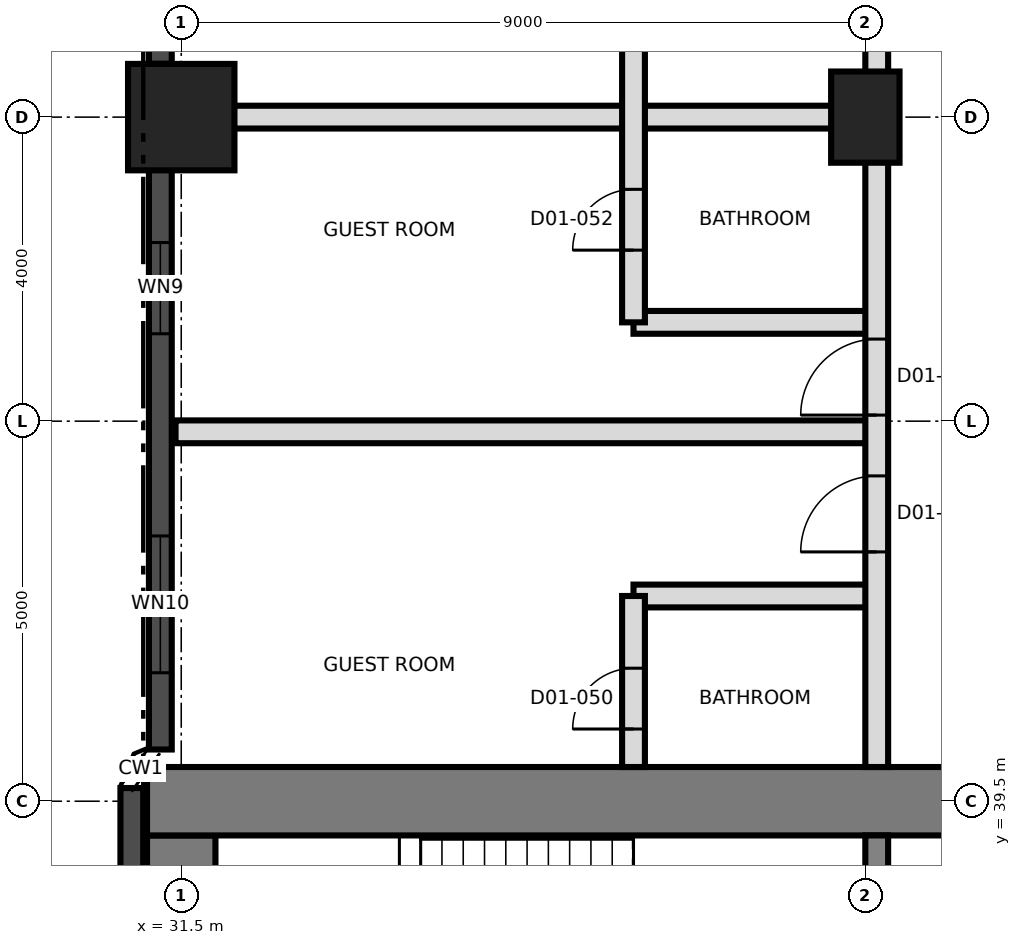
"""IFC4 building model, lengths in metres.
Left out: names, types, materials, properties, quantities, classifications, styles, units other than length and angle.
Written with IfcOpenShell. Run it as: python <this file> out.ifc"""

import sys

from ifc_helpers import new_model, si_unit, direction, frame, frame_2d, origin, origin_2d, place, context, subcontext, project, spatial, rectangle, extrude, element, fill, save


model = new_model("IFC4")
c1 = context("Model", 3, precision=1e-05, world=origin(), true_north=direction((0.0, 1.0)))
c2 = subcontext(c1, "Body", "Model", "MODEL_VIEW")
j1 = project(units=[si_unit("LENGTHUNIT", "METRE"), si_unit("PLANEANGLEUNIT", "RADIAN")], contexts=[c1])
p1 = place(None, origin())
s1 = spatial("IfcSite", under=j1, at=p1, CompositionType="ELEMENT")
p2 = place(p1, origin())
s2 = spatial("IfcBuilding", under=s1, at=p2, CompositionType="ELEMENT")
p3 = place(p2, frame((0.0, 0.0, 40.9)))
s3 = spatial("IfcBuildingStorey", under=s2, at=p3, CompositionType="ELEMENT", Elevation=40.9)
p4 = place(p3, frame((31.5, 21.95, 0.0), z_axis=(0.0, 0.0, 1.0), x_axis=(0.0, 1.0, 0.0)))
e1 = element("IfcWall", 1, at=p4, inside=s3, PredefinedType="SHEAR", context=c2, shape_type="SweptSolid", body=[
    extrude(rectangle(XDim=17.1, YDim=0.9, at=frame_2d((8.55, 0.0))), origin(), (0.0, 0.0, 1.0), 3.7),
])
p5 = place(p3, frame((31.05, 39.5, 0.0), z_axis=(0.0, 0.0, 1.0), x_axis=(1.0, 0.0, 0.0)))
e2 = element("IfcWall", 2, at=p5, inside=s3, PredefinedType="SHEAR", context=c2, shape_type="SweptSolid", body=[
    extrude(rectangle(XDim=27.0, YDim=0.9, at=frame_2d((13.5, 0.0))), origin(), (0.0, 0.0, 1.0), 3.7),
])
p6 = place(p5, frame((10.65, 0.0, 0.0)))
e3 = element("IfcOpeningElement", 3, at=p6, cuts=e2, PredefinedType="OPENING", context=c2, shape_type="SweptSolid", body=[
    extrude(rectangle(XDim=1.2, YDim=2.1, at=frame_2d((0.6, 1.05))), frame((0.0, 0.46, 0.0), z_axis=(0.0, -1.0, 0.0), x_axis=(1.0, 0.0, 0.0)), (0.0, 0.0, 1.0), 0.92),
])
p7 = place(p3, frame((40.65, 33.5, 0.0), z_axis=(0.0, 0.0, 1.0), x_axis=(0.0, 1.0, 0.0)))
e4 = element("IfcWall", 4, at=p7, inside=s3, PredefinedType="SHEAR", context=c2, shape_type="SweptSolid", body=[
    extrude(rectangle(XDim=5.55, YDim=0.3, at=frame_2d((2.775, 0.0))), origin(), (0.0, 0.0, 1.0), 3.7),
])
p8 = place(p3, frame((31.5, 48.5, 0.0), z_axis=(0.0, 0.0, 1.0), x_axis=(1.0, 0.0, 0.0)))
e5 = element("IfcColumn", 5, at=p8, inside=s3, PredefinedType="COLUMN", context=c2, shape_type="SweptSolid", body=[
    extrude(rectangle(XDim=1.4, YDim=1.4, at=origin_2d()), origin(), (0.0, 0.0, 1.0), 3.7),
])
p9 = place(p3, frame((40.5, 48.5, 0.0), z_axis=(0.0, 0.0, 1.0), x_axis=(0.0, 1.0, 0.0)))
e6 = element("IfcColumn", 6, at=p9, inside=s3, PredefinedType="COLUMN", context=c2, shape_type="SweptSolid", body=[
    extrude(rectangle(XDim=1.2, YDim=0.9, at=origin_2d()), origin(), (0.0, 0.0, 1.0), 3.7),
])
p10 = place(p3, frame((31.225, 56.8, 0.0), z_axis=(0.0, 0.0, 1.0), x_axis=(0.0, -1.0, 0.0)))
e7 = element("IfcWall", 7, at=p10, inside=s3, PredefinedType="SOLIDWALL", context=c2, shape_type="SweptSolid", body=[
    extrude(rectangle(XDim=7.6, YDim=0.3, at=frame_2d((3.8, 0.0))), origin(), (0.0, 0.0, 1.0), 2.7),
])
p11 = place(p10, frame((0.95, 0.0, 0.9)))
e8 = element("IfcOpeningElement", 8, at=p11, cuts=e7, PredefinedType="OPENING", context=c2, shape_type="SweptSolid", body=[
    extrude(rectangle(XDim=1.2, YDim=1.5, at=frame_2d((0.6, 0.75))), frame((0.0, 0.16, 0.0), z_axis=(0.0, -1.0, 0.0), x_axis=(1.0, 0.0, 0.0)), (0.0, 0.0, 1.0), 0.32),
])
p12 = place(p10, frame((5.45, 0.0, 0.9)))
e9 = element("IfcOpeningElement", 9, at=p12, cuts=e7, PredefinedType="OPENING", context=c2, shape_type="SweptSolid", body=[
    extrude(rectangle(XDim=1.2, YDim=1.5, at=frame_2d((0.6, 0.75))), frame((0.0, 0.16, 0.0), z_axis=(0.0, -1.0, 0.0), x_axis=(1.0, 0.0, 0.0)), (0.0, 0.0, 1.0), 0.32),
])
p13 = place(p3, frame((31.225, 49.2, 0.0), z_axis=(0.0, 0.0, 1.0), x_axis=(0.0, -1.0, 0.0)))
e10 = element("IfcWall", 10, at=p13, inside=s3, PredefinedType="SOLIDWALL", context=c2, shape_type="SweptSolid", body=[
    extrude(rectangle(XDim=9.02, YDim=0.3, at=frame_2d((4.51, 0.0))), origin(), (0.0, 0.0, 1.0), 3.4),
])
p14 = place(p13, frame((2.35, 0.0, 0.9)))
e11 = element("IfcOpeningElement", 11, at=p14, cuts=e10, PredefinedType="OPENING", context=c2, shape_type="SweptSolid", body=[
    extrude(rectangle(XDim=1.2, YDim=1.5, at=frame_2d((0.6, 0.75))), frame((0.0, 0.16, 0.0), z_axis=(0.0, -1.0, 0.0), x_axis=(1.0, 0.0, 0.0)), (0.0, 0.0, 1.0), 0.32),
])
p15 = place(p13, frame((6.21, 0.0, 0.3)))
e12 = element("IfcOpeningElement", 12, at=p15, cuts=e10, PredefinedType="OPENING", context=c2, shape_type="SweptSolid", body=[
    extrude(rectangle(XDim=1.8, YDim=2.4, at=frame_2d((0.9, 1.2))), frame((0.0, 0.16, 0.0), z_axis=(0.0, -1.0, 0.0), x_axis=(1.0, 0.0, 0.0)), (0.0, 0.0, 1.0), 0.32),
])
p16 = place(p3, frame((30.85, 39.674, 0.0), z_axis=(0.0, 0.0, 1.0), x_axis=(0.0, -1.0, 0.0)))
e13 = element("IfcWall", 13, at=p16, inside=s3, PredefinedType="SOLIDWALL", context=c2, shape_type="SweptSolid", body=[
    extrude(rectangle(XDim=18.314, YDim=0.3, at=frame_2d((9.157, 0.0))), origin(), (0.0, 0.0, 1.0), 3.4),
])
p17 = place(p3, frame((37.45, 42.2, 0.0), z_axis=(0.0, 0.0, 1.0), x_axis=(1.0, 0.0, 0.0)))
e14 = element("IfcWall", 14, at=p17, inside=s3, PredefinedType="PARTITIONING", context=c2, shape_type="SweptSolid", body=[
    extrude(rectangle(XDim=3.2, YDim=0.3, at=frame_2d((1.6, 0.0))), origin(), (0.0, 0.0, 1.0), 3.4),
])
p18 = place(p3, frame((31.425, 44.36, 0.0), z_axis=(0.0, 0.0, 1.0), x_axis=(1.0, 0.0, 0.0)))
e15 = element("IfcWall", 15, at=p18, inside=s3, PredefinedType="PARTITIONING", context=c2, shape_type="SweptSolid", body=[
    extrude(rectangle(XDim=9.225, YDim=0.3, at=frame_2d((4.612, 0.0))), origin(), (0.0, 0.0, 1.0), 3.4),
])
p19 = place(p3, frame((37.45, 45.8, 0.0), z_axis=(0.0, 0.0, 1.0), x_axis=(1.0, 0.0, 0.0)))
e16 = element("IfcWall", 16, at=p19, inside=s3, PredefinedType="PARTITIONING", context=c2, shape_type="SweptSolid", body=[
    extrude(rectangle(XDim=3.2, YDim=0.3, at=frame_2d((1.6, 0.0))), origin(), (0.0, 0.0, 1.0), 3.4),
])
p20 = place(p3, frame((31.425, 48.5, 0.0), z_axis=(0.0, 0.0, 1.0), x_axis=(1.0, 0.0, 0.0)))
e17 = element("IfcWall", 17, at=p20, inside=s3, PredefinedType="PARTITIONING", context=c2, shape_type="SweptSolid", body=[
    extrude(rectangle(XDim=9.225, YDim=0.3, at=frame_2d((4.612, 0.0))), origin(), (0.0, 0.0, 1.0), 3.4),
])
p21 = place(p3, frame((37.45, 39.95, 0.0), z_axis=(0.0, 0.0, 1.0), x_axis=(0.0, 1.0, 0.0)))
e18 = element("IfcWall", 18, at=p21, inside=s3, PredefinedType="PARTITIONING", context=c2, shape_type="SweptSolid", body=[
    extrude(rectangle(XDim=2.25, YDim=0.3, at=frame_2d((1.125, 0.0))), origin(), (0.0, 0.0, 1.0), 3.4),
])
p22 = place(p21, frame((0.5, 0.0, 0.0)))
e19 = element("IfcOpeningElement", 19, at=p22, cuts=e18, PredefinedType="OPENING", context=c2, shape_type="SweptSolid", body=[
    extrude(rectangle(XDim=0.8, YDim=2.1, at=frame_2d((0.4, 1.05))), frame((0.0, 0.16, 0.0), z_axis=(0.0, -1.0, 0.0), x_axis=(1.0, 0.0, 0.0)), (0.0, 0.0, 1.0), 0.32),
])
p23 = place(p3, frame((37.45, 45.8, 0.0), z_axis=(0.0, 0.0, 1.0), x_axis=(0.0, 1.0, 0.0)))
e20 = element("IfcWall", 20, at=p23, inside=s3, PredefinedType="PARTITIONING", context=c2, shape_type="SweptSolid", body=[
    extrude(rectangle(XDim=5.4, YDim=0.3, at=frame_2d((2.7, 0.0))), origin(), (0.0, 0.0, 1.0), 3.4),
])
p24 = place(p23, frame((0.95, 0.0, 0.0)))
e21 = element("IfcOpeningElement", 21, at=p24, cuts=e20, PredefinedType="OPENING", context=c2, shape_type="SweptSolid", body=[
    extrude(rectangle(XDim=0.8, YDim=2.1, at=frame_2d((0.4, 1.05))), frame((0.0, 0.16, 0.0), z_axis=(0.0, -1.0, 0.0), x_axis=(1.0, 0.0, 0.0)), (0.0, 0.0, 1.0), 0.32),
])
p25 = place(p23, frame((3.65, 0.0, 0.0)))
e22 = element("IfcOpeningElement", 22, at=p25, cuts=e20, PredefinedType="OPENING", context=c2, shape_type="SweptSolid", body=[
    extrude(rectangle(XDim=0.8, YDim=2.1, at=frame_2d((0.4, 1.05))), frame((0.0, 0.16, 0.0), z_axis=(0.0, -1.0, 0.0), x_axis=(1.0, 0.0, 0.0)), (0.0, 0.0, 1.0), 0.32),
])
p26 = place(p3, frame((40.65, 39.95, 0.0), z_axis=(0.0, 0.0, 1.0), x_axis=(0.0, 1.0, 0.0)))
e23 = element("IfcWall", 23, at=p26, inside=s3, PredefinedType="PARTITIONING", context=c2, shape_type="SweptSolid", body=[
    extrude(rectangle(XDim=35.625, YDim=0.3, at=frame_2d((17.812, 0.0))), origin(), (0.0, 0.0, 1.0), 3.4),
])
p27 = place(p26, frame((2.83, 0.0, 0.0)))
e24 = element("IfcOpeningElement", 24, at=p27, cuts=e23, PredefinedType="OPENING", context=c2, shape_type="SweptSolid", body=[
    extrude(rectangle(XDim=1.0, YDim=2.1, at=frame_2d((0.5, 1.05))), frame((0.0, 0.16, 0.0), z_axis=(0.0, -1.0, 0.0), x_axis=(1.0, 0.0, 0.0)), (0.0, 0.0, 1.0), 0.32),
])
p28 = place(p26, frame((4.63, 0.0, 0.0)))
e25 = element("IfcOpeningElement", 25, at=p28, cuts=e23, PredefinedType="OPENING", context=c2, shape_type="SweptSolid", body=[
    extrude(rectangle(XDim=1.0, YDim=2.1, at=frame_2d((0.5, 1.05))), frame((0.0, 0.16, 0.0), z_axis=(0.0, -1.0, 0.0), x_axis=(1.0, 0.0, 0.0)), (0.0, 0.0, 1.0), 0.32),
])
p29 = place(p26, frame((11.47, 0.0, 0.0)))
e26 = element("IfcOpeningElement", 26, at=p29, cuts=e23, PredefinedType="OPENING", context=c2, shape_type="SweptSolid", body=[
    extrude(rectangle(XDim=1.0, YDim=2.1, at=frame_2d((0.5, 1.05))), frame((0.0, 0.16, 0.0), z_axis=(0.0, -1.0, 0.0), x_axis=(1.0, 0.0, 0.0)), (0.0, 0.0, 1.0), 0.32),
])
p30 = place(p26, frame((13.27, 0.0, 0.0)))
e27 = element("IfcOpeningElement", 27, at=p30, cuts=e23, PredefinedType="OPENING", context=c2, shape_type="SweptSolid", body=[
    extrude(rectangle(XDim=1.0, YDim=2.1, at=frame_2d((0.5, 1.05))), frame((0.0, 0.16, 0.0), z_axis=(0.0, -1.0, 0.0), x_axis=(1.0, 0.0, 0.0)), (0.0, 0.0, 1.0), 0.32),
])
p31 = place(p26, frame((21.05, 0.0, 0.0)))
e28 = element("IfcOpeningElement", 28, at=p31, cuts=e23, PredefinedType="OPENING", context=c2, shape_type="SweptSolid", body=[
    extrude(rectangle(XDim=1.0, YDim=2.4, at=frame_2d((0.5, 1.2))), frame((0.0, 0.16, 0.0), z_axis=(0.0, -1.0, 0.0), x_axis=(1.0, 0.0, 0.0)), (0.0, 0.0, 1.0), 0.32),
])
p32 = place(p14, origin())
e29 = element("IfcWindow", 29, at=p32, inside=s3, PartitioningType="SINGLE_PANEL", PredefinedType="WINDOW", context=c2, shape_type="SweptSolid", body=[
    extrude(rectangle(XDim=1.2, YDim=1.5, at=frame_2d((0.6, 0.75))), frame((0.0, 0.03, 0.0), z_axis=(0.0, -1.0, 0.0), x_axis=(1.0, 0.0, 0.0)), (0.0, 0.0, 1.0), 0.06),
])
fill(e11, e29)
p33 = place(p15, origin())
e30 = element("IfcWindow", 30, at=p33, inside=s3, PartitioningType="SINGLE_PANEL", PredefinedType="WINDOW", context=c2, shape_type="SweptSolid", body=[
    extrude(rectangle(XDim=1.8, YDim=2.4, at=frame_2d((0.9, 1.2))), frame((0.0, 0.03, 0.0), z_axis=(0.0, -1.0, 0.0), x_axis=(1.0, 0.0, 0.0)), (0.0, 0.0, 1.0), 0.06),
])
fill(e12, e30)
p34 = place(p22, origin())
e31 = element("IfcDoor", 31, at=p34, inside=s3, OperationType="SINGLE_SWING_LEFT", PredefinedType="DOOR", context=c2, shape_type="SweptSolid", body=[
    extrude(rectangle(XDim=0.8, YDim=2.1, at=frame_2d((0.4, 1.05))), frame((0.0, 0.025, 0.0), z_axis=(0.0, -1.0, 0.0), x_axis=(1.0, 0.0, 0.0)), (0.0, 0.0, 1.0), 0.05),
])
fill(e19, e31)
p35 = place(p27, origin())
e32 = element("IfcDoor", 32, at=p35, inside=s3, OperationType="SINGLE_SWING_RIGHT", PredefinedType="DOOR", context=c2, shape_type="SweptSolid", body=[
    extrude(rectangle(XDim=1.0, YDim=2.1, at=frame_2d((0.5, 1.05))), frame((0.0, 0.025, 0.0), z_axis=(0.0, -1.0, 0.0), x_axis=(1.0, 0.0, 0.0)), (0.0, 0.0, 1.0), 0.05),
])
fill(e24, e32)
p36 = place(p24, origin())
e33 = element("IfcDoor", 33, at=p36, inside=s3, OperationType="SINGLE_SWING_RIGHT", PredefinedType="DOOR", context=c2, shape_type="SweptSolid", body=[
    extrude(rectangle(XDim=0.8, YDim=2.1, at=frame_2d((0.4, 1.05))), frame((0.0, 0.025, 0.0), z_axis=(0.0, -1.0, 0.0), x_axis=(1.0, 0.0, 0.0)), (0.0, 0.0, 1.0), 0.05),
])
fill(e21, e33)
p37 = place(p28, origin())
e34 = element("IfcDoor", 34, at=p37, inside=s3, OperationType="SINGLE_SWING_LEFT", PredefinedType="DOOR", context=c2, shape_type="SweptSolid", body=[
    extrude(rectangle(XDim=1.0, YDim=2.1, at=frame_2d((0.5, 1.05))), frame((0.0, 0.025, 0.0), z_axis=(0.0, -1.0, 0.0), x_axis=(1.0, 0.0, 0.0)), (0.0, 0.0, 1.0), 0.05),
])
fill(e25, e34)
save(model, sys.argv[1])
